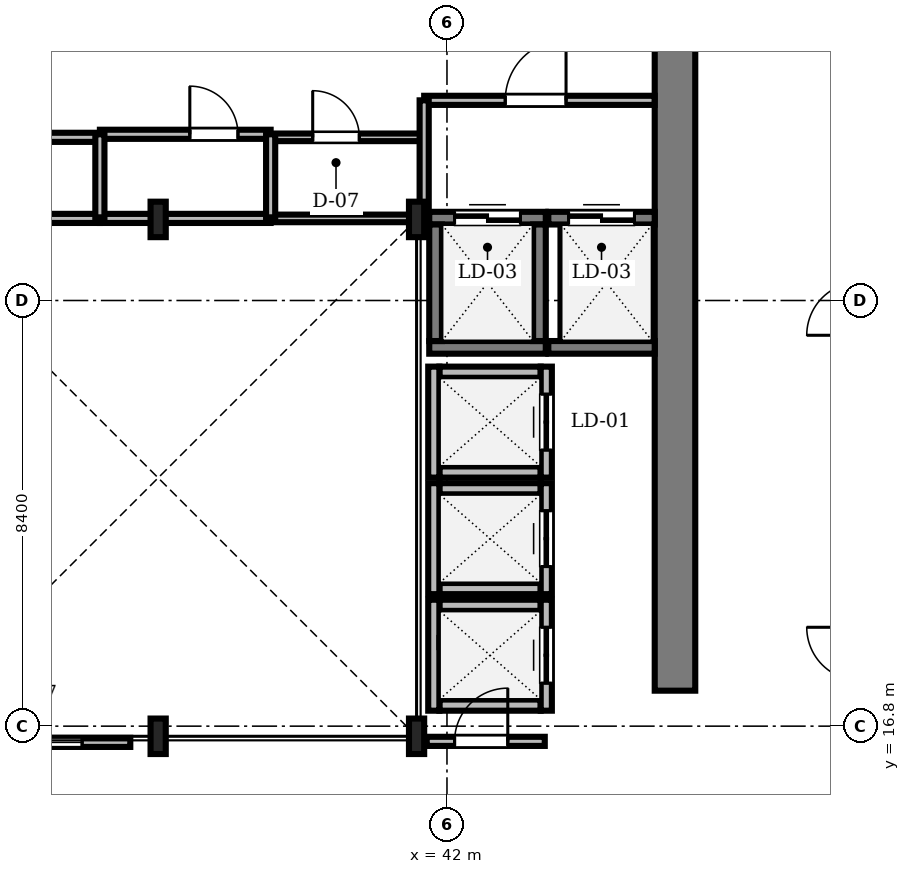
"""IFC4 building model, lengths in metres.
Left out: names, types, materials, properties, quantities, classifications, styles, units other than length and angle.
Written with IfcOpenShell. Run it as: python <this file> out.ifc"""

import sys

from ifc_helpers import new_model, si_unit, direction, frame, frame_2d, origin, origin_2d, place, context, subcontext, project, spatial, rectangle, i_section, extrude, source, transform, mapped, element, fill, save


model = new_model("IFC4")
c1 = context("Model", 3, precision=1e-05, world=origin(), true_north=direction((0.0, 1.0)))
c2 = subcontext(c1, "Body", "Model", "MODEL_VIEW")
j1 = project(units=[si_unit("LENGTHUNIT", "METRE"), si_unit("PLANEANGLEUNIT", "RADIAN")], contexts=[c1])
p1 = place(None, origin())
s1 = spatial("IfcSite", under=j1, at=p1, CompositionType="ELEMENT")
p2 = place(p1, origin())
s2 = spatial("IfcBuilding", under=s1, at=p2, CompositionType="ELEMENT")
p3 = place(p2, frame((0.0, 0.0, 196.05)))
s3 = spatial("IfcBuildingStorey", under=s2, at=p3, CompositionType="ELEMENT", Elevation=196.05)
m1 = source(origin(), c2, "Body", "SweptSolid", [
    extrude(rectangle(XDim=13.15, YDim=0.8, at=frame_2d((6.575, 0.0))), origin(), (0.0, 0.0, 1.0), 3.53),
])
p4 = place(p3, frame((46.5, 17.5, 0.0), z_axis=(0.0, 0.0, 1.0), x_axis=(0.0, 1.0, 0.0)))
e1 = element("IfcWall", 1, at=p4, inside=s3, PredefinedType="SHEAR", context=c2, shape_type="MappedRepresentation", body=[
    mapped(m1, transform((0.0, 0.0, 0.0), scale=1.0)),
])
m2 = source(origin(), c2, "Body", "SweptSolid", [
    extrude(i_section(OverallWidth=0.3, OverallDepth=0.7, WebThickness=0.017, FlangeThickness=0.032, FilletRadius=0.027, at=origin_2d()), origin(), (0.0, 0.0, 1.0), 3.53),
])
for number, where, z_axis, x_axis in (
    (2, (36.3, 16.6, 0.0), (0.0, 0.0, 1.0), (1.0, 0.0, 0.0)),
    (3, (41.4, 16.6, 0.0), (0.0, 0.0, 1.0), (1.0, 0.0, 0.0)),
    (4, (41.4, 26.8, 0.0), (0.0, 0.0, 1.0), (1.0, 0.0, 0.0)),
    (5, (36.3, 26.8, 0.0), (0.0, 0.0, 1.0), (1.0, 0.0, 0.0)),
):
    element("IfcColumn", number, at=place(p3, frame(where, z_axis=z_axis, x_axis=x_axis)), inside=s3, PredefinedType="COLUMN", context=c2, shape_type="MappedRepresentation", body=[
        mapped(m2, transform((0.0, 0.0, 0.0), scale=1.0)),
    ])
m3 = source(origin(), c2, "Body", "SweptSolid", [
    extrude(rectangle(XDim=2.0, YDim=0.22, at=frame_2d((1.0, 0.0))), origin(), (0.0, 0.0, 1.0), 3.53),
])
for number, where, z_axis, x_axis in (
    (6, (41.85, 21.815, 0.0), (0.0, 0.0, 1.0), (1.0, 0.0, 0.0)),
    (7, (41.85, 23.785, 0.0), (0.0, 0.0, 1.0), (1.0, 0.0, 0.0)),
):
    element("IfcWall", number, at=place(p3, frame(where, z_axis=z_axis, x_axis=x_axis)), inside=s3, PredefinedType="SOLIDWALL", context=c2, shape_type="MappedRepresentation", body=[
        mapped(m3, transform((0.0, 0.0, 0.0), scale=1.0)),
    ])
m4 = source(origin(), c2, "Body", "SweptSolid", [
    extrude(rectangle(XDim=2.19, YDim=0.22, at=frame_2d((1.095, 0.0))), origin(), (0.0, 0.0, 1.0), 3.53),
])
p5 = place(p3, frame((41.74, 21.705, 0.0), z_axis=(0.0, 0.0, 1.0), x_axis=(0.0, 1.0, 0.0)))
e8 = element("IfcWall", 8, at=p5, inside=s3, PredefinedType="SOLIDWALL", context=c2, shape_type="MappedRepresentation", body=[
    mapped(m4, transform((0.0, 0.0, 0.0), scale=1.0)),
])
p6 = place(p3, frame((43.96, 21.705, 0.0), z_axis=(0.0, 0.0, 1.0), x_axis=(0.0, 1.0, 0.0)))
e9 = element("IfcWall", 9, at=p6, inside=s3, PredefinedType="SOLIDWALL", context=c2, shape_type="MappedRepresentation", body=[
    mapped(m4, transform((0.0, 0.0, 0.0), scale=1.0)),
])
m5 = source(origin(), c2, "Body", "SweptSolid", [
    extrude(rectangle(XDim=1.1, YDim=2.2, at=frame_2d((0.55, 1.1))), frame((0.0, 0.12, 0.0), z_axis=(0.0, -1.0, 0.0), x_axis=(1.0, 0.0, 0.0)), (0.0, 0.0, 1.0), 0.24),
])
p7 = place(p6, frame((0.545, 0.0, 0.0)))
e10 = element("IfcOpeningElement", 10, at=p7, cuts=e9, PredefinedType="OPENING", context=c2, shape_type="MappedRepresentation", body=[
    mapped(m5, transform((0.0, 0.0, 0.0), scale=1.0)),
])
for number, where, z_axis, x_axis in (
    (11, (41.85, 19.515, 0.0), (0.0, 0.0, 1.0), (1.0, 0.0, 0.0)),
    (12, (41.85, 21.485, 0.0), (0.0, 0.0, 1.0), (1.0, 0.0, 0.0)),
):
    element("IfcWall", number, at=place(p3, frame(where, z_axis=z_axis, x_axis=x_axis)), inside=s3, PredefinedType="SOLIDWALL", context=c2, shape_type="MappedRepresentation", body=[
        mapped(m3, transform((0.0, 0.0, 0.0), scale=1.0)),
    ])
p8 = place(p3, frame((41.74, 19.405, 0.0), z_axis=(0.0, 0.0, 1.0), x_axis=(0.0, 1.0, 0.0)))
e13 = element("IfcWall", 13, at=p8, inside=s3, PredefinedType="SOLIDWALL", context=c2, shape_type="MappedRepresentation", body=[
    mapped(m4, transform((0.0, 0.0, 0.0), scale=1.0)),
])
p9 = place(p3, frame((43.96, 19.405, 0.0), z_axis=(0.0, 0.0, 1.0), x_axis=(0.0, 1.0, 0.0)))
e14 = element("IfcWall", 14, at=p9, inside=s3, PredefinedType="SOLIDWALL", context=c2, shape_type="MappedRepresentation", body=[
    mapped(m4, transform((0.0, 0.0, 0.0), scale=1.0)),
])
p10 = place(p9, frame((0.545, 0.0, 0.0)))
e15 = element("IfcOpeningElement", 15, at=p10, cuts=e14, PredefinedType="OPENING", context=c2, shape_type="MappedRepresentation", body=[
    mapped(m5, transform((0.0, 0.0, 0.0), scale=1.0)),
])
for number, where, z_axis, x_axis in (
    (16, (41.85, 17.215, 0.0), (0.0, 0.0, 1.0), (1.0, 0.0, 0.0)),
    (17, (41.85, 19.185, 0.0), (0.0, 0.0, 1.0), (1.0, 0.0, 0.0)),
):
    element("IfcWall", number, at=place(p3, frame(where, z_axis=z_axis, x_axis=x_axis)), inside=s3, PredefinedType="SOLIDWALL", context=c2, shape_type="MappedRepresentation", body=[
        mapped(m3, transform((0.0, 0.0, 0.0), scale=1.0)),
    ])
p11 = place(p3, frame((41.74, 17.105, 0.0), z_axis=(0.0, 0.0, 1.0), x_axis=(0.0, 1.0, 0.0)))
e18 = element("IfcWall", 18, at=p11, inside=s3, PredefinedType="SOLIDWALL", context=c2, shape_type="MappedRepresentation", body=[
    mapped(m4, transform((0.0, 0.0, 0.0), scale=1.0)),
])
p12 = place(p3, frame((43.96, 17.105, 0.0), z_axis=(0.0, 0.0, 1.0), x_axis=(0.0, 1.0, 0.0)))
e19 = element("IfcWall", 19, at=p12, inside=s3, PredefinedType="SOLIDWALL", context=c2, shape_type="MappedRepresentation", body=[
    mapped(m4, transform((0.0, 0.0, 0.0), scale=1.0)),
])
p13 = place(p12, frame((0.545, 0.0, 0.0)))
e20 = element("IfcOpeningElement", 20, at=p13, cuts=e19, PredefinedType="OPENING", context=c2, shape_type="MappedRepresentation", body=[
    mapped(m5, transform((0.0, 0.0, 0.0), scale=1.0)),
])
m6 = source(origin(), c2, "Body", "SweptSolid", [
    extrude(rectangle(XDim=2.3, YDim=0.25, at=frame_2d((1.15, 0.0))), origin(), (0.0, 0.0, 1.0), 3.53),
])
p14 = place(p3, frame((41.65, 24.275, 0.0), z_axis=(0.0, 0.0, 1.0), x_axis=(1.0, 0.0, 0.0)))
e21 = element("IfcWall", 21, at=p14, inside=s3, PredefinedType="SOLIDWALL", context=c2, shape_type="MappedRepresentation", body=[
    mapped(m6, transform((0.0, 0.0, 0.0), scale=1.0)),
])
p15 = place(p3, frame((41.65, 26.825, 0.0), z_axis=(0.0, 0.0, 1.0), x_axis=(1.0, 0.0, 0.0)))
e22 = element("IfcWall", 22, at=p15, inside=s3, PredefinedType="SOLIDWALL", context=c2, shape_type="MappedRepresentation", body=[
    mapped(m6, transform((0.0, 0.0, 0.0), scale=1.0)),
])
m7 = source(origin(), c2, "Body", "SweptSolid", [
    extrude(rectangle(XDim=1.3, YDim=2.3, at=frame_2d((0.65, 1.15))), frame((0.0, 0.135, 0.0), z_axis=(0.0, -1.0, 0.0), x_axis=(1.0, 0.0, 0.0)), (0.0, 0.0, 1.0), 0.27),
])
p16 = place(p15, frame((0.5, 0.0, 0.0)))
e23 = element("IfcOpeningElement", 23, at=p16, cuts=e22, PredefinedType="OPENING", context=c2, shape_type="MappedRepresentation", body=[
    mapped(m7, transform((0.0, 0.0, 0.0), scale=1.0)),
])
for number, where, z_axis, x_axis in (
    (24, (41.775, 24.4, 0.0), (0.0, 0.0, 1.0), (0.0, 1.0, 0.0)),
    (25, (43.825, 24.4, 0.0), (0.0, 0.0, 1.0), (0.0, 1.0, 0.0)),
):
    element("IfcWall", number, at=place(p3, frame(where, z_axis=z_axis, x_axis=x_axis)), inside=s3, PredefinedType="SOLIDWALL", context=c2, shape_type="MappedRepresentation", body=[
        mapped(m6, transform((0.0, 0.0, 0.0), scale=1.0)),
    ])
m8 = source(origin(), c2, "Body", "SweptSolid", [
    extrude(rectangle(XDim=2.1, YDim=0.25, at=frame_2d((1.05, 0.0))), origin(), (0.0, 0.0, 1.0), 3.53),
])
p17 = place(p3, frame((44.0, 24.275, 0.0), z_axis=(0.0, 0.0, 1.0), x_axis=(1.0, 0.0, 0.0)))
e26 = element("IfcWall", 26, at=p17, inside=s3, PredefinedType="SOLIDWALL", context=c2, shape_type="MappedRepresentation", body=[
    mapped(m8, transform((0.0, 0.0, 0.0), scale=1.0)),
])
p18 = place(p3, frame((44.0, 26.825, 0.0), z_axis=(0.0, 0.0, 1.0), x_axis=(1.0, 0.0, 0.0)))
e27 = element("IfcWall", 27, at=p18, inside=s3, PredefinedType="SOLIDWALL", context=c2, shape_type="MappedRepresentation", body=[
    mapped(m8, transform((0.0, 0.0, 0.0), scale=1.0)),
])
p19 = place(p18, frame((0.4, 0.0, 0.0)))
e28 = element("IfcOpeningElement", 28, at=p19, cuts=e27, PredefinedType="OPENING", context=c2, shape_type="MappedRepresentation", body=[
    mapped(m7, transform((0.0, 0.0, 0.0), scale=1.0)),
])
m9 = source(origin(), c2, "Body", "SweptSolid", [
    extrude(rectangle(XDim=4.548, YDim=0.18, at=frame_2d((2.274, 0.0))), origin(), (0.0, 0.0, 1.0), 3.162),
])
p20 = place(p3, frame((41.55, 29.15, 0.0), z_axis=(0.0, 0.0, 1.0), x_axis=(1.0, 0.0, 0.0)))
e29 = element("IfcWall", 29, at=p20, inside=s3, PredefinedType="PARTITIONING", context=c2, shape_type="MappedRepresentation", body=[
    mapped(m9, transform((0.0, 0.0, 0.0), scale=1.0)),
])
m10 = source(origin(), c2, "Body", "SweptSolid", [
    extrude(rectangle(XDim=1.2, YDim=2.2, at=frame_2d((0.6, 1.1))), frame((0.0, 0.1, 0.0), z_axis=(0.0, -1.0, 0.0), x_axis=(1.0, 0.0, 0.0)), (0.0, 0.0, 1.0), 0.2),
])
p21 = place(p20, frame((1.6, 0.0, 0.0)))
e30 = element("IfcOpeningElement", 30, at=p21, cuts=e29, PredefinedType="OPENING", context=c2, shape_type="MappedRepresentation", body=[
    mapped(m10, transform((0.0, 0.0, 0.0), scale=1.0)),
])
m11 = source(origin(), c2, "Body", "SweptSolid", [
    extrude(rectangle(XDim=3.7, YDim=0.18, at=frame_2d((1.85, 0.0))), origin(), (0.0, 0.0, 1.0), 3.162),
])
p22 = place(p3, frame((31.45, 28.42, 0.0), z_axis=(0.0, 0.0, 1.0), x_axis=(1.0, 0.0, 0.0)))
e31 = element("IfcWall", 31, at=p22, inside=s3, PredefinedType="PARTITIONING", context=c2, shape_type="MappedRepresentation", body=[
    mapped(m11, transform((0.0, 0.0, 0.0), scale=1.0)),
])
m12 = source(origin(), c2, "Body", "SweptSolid", [
    extrude(rectangle(XDim=0.92, YDim=2.1, at=frame_2d((0.46, 1.05))), frame((0.0, 0.1, 0.0), z_axis=(0.0, -1.0, 0.0), x_axis=(1.0, 0.0, 0.0)), (0.0, 0.0, 1.0), 0.2),
])
p23 = place(p22, frame((0.9, 0.0, 0.0)))
e32 = element("IfcOpeningElement", 32, at=p23, cuts=e31, PredefinedType="OPENING", context=c2, shape_type="MappedRepresentation", body=[
    mapped(m12, transform((0.0, 0.0, 0.0), scale=1.0)),
])
m13 = source(origin(), c2, "Body", "SweptSolid", [
    extrude(rectangle(XDim=3.37, YDim=0.18, at=frame_2d((1.685, 0.0))), origin(), (0.0, 0.0, 1.0), 3.53),
])
p24 = place(p3, frame((35.15, 28.48, 0.0), z_axis=(0.0, 0.0, 1.0), x_axis=(1.0, 0.0, 0.0)))
e33 = element("IfcWall", 33, at=p24, inside=s3, PredefinedType="PARTITIONING", context=c2, shape_type="MappedRepresentation", body=[
    mapped(m13, transform((0.0, 0.0, 0.0), scale=1.0)),
])
m14 = source(origin(), c2, "Body", "SweptSolid", [
    extrude(rectangle(XDim=0.95, YDim=2.15, at=frame_2d((0.475, 1.075))), frame((0.0, 0.1, 0.0), z_axis=(0.0, -1.0, 0.0), x_axis=(1.0, 0.0, 0.0)), (0.0, 0.0, 1.0), 0.2),
])
p25 = place(p24, frame((1.775, 0.0, 0.0)))
e34 = element("IfcOpeningElement", 34, at=p25, cuts=e33, PredefinedType="OPENING", context=c2, shape_type="MappedRepresentation", body=[
    mapped(m14, transform((0.0, 0.0, 0.0), scale=1.0)),
])
m15 = source(origin(), c2, "Body", "SweptSolid", [
    extrude(rectangle(XDim=3.0, YDim=0.15, at=frame_2d((1.5, 0.0))), origin(), (0.0, 0.0, 1.0), 3.53),
])
p26 = place(p3, frame((38.52, 28.42, 0.0), z_axis=(0.0, 0.0, 1.0), x_axis=(1.0, 0.0, 0.0)))
e35 = element("IfcWall", 35, at=p26, inside=s3, PredefinedType="PARTITIONING", context=c2, shape_type="MappedRepresentation", body=[
    mapped(m15, transform((0.0, 0.0, 0.0), scale=1.0)),
])
m16 = source(origin(), c2, "Body", "SweptSolid", [
    extrude(rectangle(XDim=0.92, YDim=2.1, at=frame_2d((0.46, 1.05))), frame((0.0, 0.085, 0.0), z_axis=(0.0, -1.0, 0.0), x_axis=(1.0, 0.0, 0.0)), (0.0, 0.0, 1.0), 0.17),
])
p27 = place(p26, frame((0.83, 0.0, 0.0)))
e36 = element("IfcOpeningElement", 36, at=p27, cuts=e35, PredefinedType="OPENING", context=c2, shape_type="MappedRepresentation", body=[
    mapped(m16, transform((0.0, 0.0, 0.0), scale=1.0)),
])
m17 = source(origin(), c2, "Body", "SweptSolid", [
    extrude(rectangle(XDim=2.33, YDim=0.18, at=frame_2d((1.165, 0.0))), origin(), (0.0, 0.0, 1.0), 2.972),
])
p28 = place(p3, frame((41.6, 16.5, 0.0), z_axis=(0.0, 0.0, 1.0), x_axis=(1.0, 0.0, 0.0)))
e37 = element("IfcWall", 37, at=p28, inside=s3, PredefinedType="PARTITIONING", context=c2, shape_type="MappedRepresentation", body=[
    mapped(m17, transform((0.0, 0.0, 0.0), scale=1.0)),
])
m18 = source(origin(), c2, "Body", "SweptSolid", [
    extrude(rectangle(XDim=1.05, YDim=2.2, at=frame_2d((0.525, 1.1))), frame((0.0, 0.1, 0.0), z_axis=(0.0, -1.0, 0.0), x_axis=(1.0, 0.0, 0.0)), (0.0, 0.0, 1.0), 0.2),
])
p29 = place(p28, frame((0.55, 0.0, 0.0)))
e38 = element("IfcOpeningElement", 38, at=p29, cuts=e37, PredefinedType="OPENING", context=c2, shape_type="MappedRepresentation", body=[
    mapped(m18, transform((0.0, 0.0, 0.0), scale=1.0)),
])
m19 = source(origin(), c2, "Body", "SweptSolid", [
    extrude(rectangle(XDim=3.7, YDim=0.18, at=frame_2d((1.85, 0.0))), origin(), (0.0, 0.0, 1.0), 3.072),
])
p30 = place(p3, frame((31.45, 26.82, 0.0), z_axis=(0.0, 0.0, 1.0), x_axis=(1.0, 0.0, 0.0)))
e39 = element("IfcWall", 39, at=p30, inside=s3, PredefinedType="PARTITIONING", context=c2, shape_type="MappedRepresentation", body=[
    mapped(m19, transform((0.0, 0.0, 0.0), scale=1.0)),
])
m20 = source(origin(), c2, "Body", "SweptSolid", [
    extrude(rectangle(XDim=3.37, YDim=0.18, at=frame_2d((1.685, 0.0))), origin(), (0.0, 0.0, 1.0), 3.072),
])
p31 = place(p3, frame((35.15, 26.82, 0.0), z_axis=(0.0, 0.0, 1.0), x_axis=(1.0, 0.0, 0.0)))
e40 = element("IfcWall", 40, at=p31, inside=s3, PredefinedType="PARTITIONING", context=c2, shape_type="MappedRepresentation", body=[
    mapped(m20, transform((0.0, 0.0, 0.0), scale=1.0)),
])
m21 = source(origin(), c2, "Body", "SweptSolid", [
    extrude(rectangle(XDim=3.0, YDim=0.15, at=frame_2d((1.5, 0.0))), origin(), (0.0, 0.0, 1.0), 2.972),
])
p32 = place(p3, frame((38.52, 26.82, 0.0), z_axis=(0.0, 0.0, 1.0), x_axis=(1.0, 0.0, 0.0)))
e41 = element("IfcWall", 41, at=p32, inside=s3, PredefinedType="PARTITIONING", context=c2, shape_type="MappedRepresentation", body=[
    mapped(m21, transform((0.0, 0.0, 0.0), scale=1.0)),
])
m22 = source(origin(), c2, "Body", "SweptSolid", [
    extrude(rectangle(XDim=2.35, YDim=0.18, at=frame_2d((1.175, 0.0))), origin(), (0.0, 0.0, 1.0), 2.972),
])
p33 = place(p3, frame((41.55, 26.8, 0.0), z_axis=(0.0, 0.0, 1.0), x_axis=(0.0, 1.0, 0.0)))
e42 = element("IfcWall", 42, at=p33, inside=s3, PredefinedType="PARTITIONING", context=c2, shape_type="MappedRepresentation", body=[
    mapped(m22, transform((0.0, 0.0, 0.0), scale=1.0)),
])
m23 = source(origin(), c2, "Body", "SweptSolid", [
    extrude(rectangle(XDim=1.858, YDim=0.18, at=frame_2d((0.929, 0.0))), origin(), (0.0, 0.0, 1.0), 3.53),
])
p34 = place(p3, frame((41.852, 18.45, 0.0), z_axis=(0.0, 0.0, 1.0), x_axis=(1.0, 0.0, 0.0)))
e43 = element("IfcWall", 43, at=p34, inside=s3, PredefinedType="PARTITIONING", context=c2, shape_type="MappedRepresentation", body=[
    mapped(m23, transform((0.0, 0.0, 0.0), scale=1.0)),
])
m24 = source(origin(), c2, "Body", "SweptSolid", [
    extrude(rectangle(XDim=1.66, YDim=0.18, at=frame_2d((0.83, 0.0))), origin(), (0.0, 0.0, 1.0), 3.072),
])
for number, where, z_axis, x_axis in (
    (44, (35.15, 26.82, 0.0), (0.0, 0.0, 1.0), (0.0, 1.0, 0.0)),
    (45, (38.52, 26.82, 0.0), (0.0, 0.0, 1.0), (0.0, 1.0, 0.0)),
):
    element("IfcWall", number, at=place(p3, frame(where, z_axis=z_axis, x_axis=x_axis)), inside=s3, PredefinedType="PARTITIONING", context=c2, shape_type="MappedRepresentation", body=[
        mapped(m24, transform((0.0, 0.0, 0.0), scale=1.0)),
    ])
m25 = source(origin(), c2, "Body", "SweptSolid", [
    extrude(rectangle(XDim=3.9, YDim=0.18, at=frame_2d((1.95, 0.0))), origin(), (0.0, 0.0, 1.0), 3.072),
])
p35 = place(p3, frame((31.85, 16.48, 0.0), z_axis=(0.0, 0.0, 1.0), x_axis=(1.0, 0.0, 0.0)))
e46 = element("IfcWall", 46, at=p35, inside=s3, PredefinedType="PARTITIONING", context=c2, shape_type="MappedRepresentation", body=[
    mapped(m25, transform((0.0, 0.0, 0.0), scale=1.0)),
])
m26 = source(origin(), c2, "Body", "SweptSolid", [
    extrude(rectangle(XDim=2.0, YDim=1.9, at=frame_2d((1.0, 0.95))), frame((0.0, 0.1, 0.0), z_axis=(0.0, -1.0, 0.0), x_axis=(1.0, 0.0, 0.0)), (0.0, 0.0, 1.0), 0.2),
])
p36 = place(p35, frame((0.95, 0.0, 0.55)))
e47 = element("IfcOpeningElement", 47, at=p36, cuts=e46, PredefinedType="OPENING", context=c2, shape_type="MappedRepresentation", body=[
    mapped(m26, transform((0.0, 0.0, 0.0), scale=1.0)),
])
m27 = source(origin(), c2, "Body", "SweptSolid", [
    extrude(rectangle(XDim=1.1, YDim=2.2, at=frame_2d((0.55, 1.1))), frame((0.0, 0.025, 0.0), z_axis=(0.0, -1.0, 0.0), x_axis=(1.0, 0.0, 0.0)), (0.0, 0.0, 1.0), 0.05),
])
p37 = place(p7, origin())
e48 = element("IfcDoor", 48, at=p37, inside=s3, OperationType="DOUBLE_DOOR_SLIDING", PredefinedType="DOOR", context=c2, shape_type="MappedRepresentation", body=[
    mapped(m27, transform((0.0, 0.0, 0.0), scale=1.0)),
])
fill(e10, e48)
p38 = place(p10, origin())
e49 = element("IfcDoor", 49, at=p38, inside=s3, OperationType="DOUBLE_DOOR_SLIDING", PredefinedType="DOOR", context=c2, shape_type="MappedRepresentation", body=[
    mapped(m27, transform((0.0, 0.0, 0.0), scale=1.0)),
])
fill(e15, e49)
p39 = place(p13, origin())
e50 = element("IfcDoor", 50, at=p39, inside=s3, OperationType="DOUBLE_DOOR_SLIDING", PredefinedType="DOOR", context=c2, shape_type="MappedRepresentation", body=[
    mapped(m27, transform((0.0, 0.0, 0.0), scale=1.0)),
])
fill(e20, e50)
m28 = source(origin(), c2, "Body", "SweptSolid", [
    extrude(rectangle(XDim=1.3, YDim=2.3, at=frame_2d((0.65, 1.15))), frame((0.0, 0.025, 0.0), z_axis=(0.0, -1.0, 0.0), x_axis=(1.0, 0.0, 0.0)), (0.0, 0.0, 1.0), 0.05),
])
p40 = place(p16, origin())
e51 = element("IfcDoor", 51, at=p40, inside=s3, OperationType="DOUBLE_DOOR_SLIDING", PredefinedType="DOOR", context=c2, shape_type="MappedRepresentation", body=[
    mapped(m28, transform((0.0, 0.0, 0.0), scale=1.0)),
])
fill(e23, e51)
p41 = place(p19, origin())
e52 = element("IfcDoor", 52, at=p41, inside=s3, OperationType="DOUBLE_DOOR_SLIDING", PredefinedType="DOOR", context=c2, shape_type="MappedRepresentation", body=[
    mapped(m28, transform((0.0, 0.0, 0.0), scale=1.0)),
])
fill(e28, e52)
m29 = source(origin(), c2, "Body", "SweptSolid", [
    extrude(rectangle(XDim=1.2, YDim=2.2, at=frame_2d((0.6, 1.1))), frame((0.0, 0.025, 0.0), z_axis=(0.0, -1.0, 0.0), x_axis=(1.0, 0.0, 0.0)), (0.0, 0.0, 1.0), 0.05),
])
p42 = place(p21, origin())
e53 = element("IfcDoor", 53, at=p42, inside=s3, OperationType="SINGLE_SWING_RIGHT", PredefinedType="DOOR", context=c2, shape_type="MappedRepresentation", body=[
    mapped(m29, transform((0.0, 0.0, 0.0), scale=1.0)),
])
fill(e30, e53)
m30 = source(origin(), c2, "Body", "SweptSolid", [
    extrude(rectangle(XDim=0.95, YDim=2.15, at=frame_2d((0.475, 1.075))), frame((0.0, 0.025, 0.0), z_axis=(0.0, -1.0, 0.0), x_axis=(1.0, 0.0, 0.0)), (0.0, 0.0, 1.0), 0.05),
])
p43 = place(p25, origin())
e54 = element("IfcDoor", 54, at=p43, inside=s3, OperationType="SINGLE_SWING_LEFT", PredefinedType="DOOR", context=c2, shape_type="MappedRepresentation", body=[
    mapped(m30, transform((0.0, 0.0, 0.0), scale=1.0)),
])
fill(e34, e54)
m31 = source(origin(), c2, "Body", "SweptSolid", [
    extrude(rectangle(XDim=0.92, YDim=2.1, at=frame_2d((0.46, 1.05))), frame((0.0, 0.025, 0.0), z_axis=(0.0, -1.0, 0.0), x_axis=(1.0, 0.0, 0.0)), (0.0, 0.0, 1.0), 0.05),
])
p44 = place(p27, origin())
e55 = element("IfcDoor", 55, at=p44, inside=s3, OperationType="SINGLE_SWING_LEFT", PredefinedType="DOOR", context=c2, shape_type="MappedRepresentation", body=[
    mapped(m31, transform((0.0, 0.0, 0.0), scale=1.0)),
])
fill(e36, e55)
m32 = source(origin(), c2, "Body", "SweptSolid", [
    extrude(rectangle(XDim=1.05, YDim=2.2, at=frame_2d((0.525, 1.1))), frame((0.0, 0.025, 0.0), z_axis=(0.0, -1.0, 0.0), x_axis=(1.0, 0.0, 0.0)), (0.0, 0.0, 1.0), 0.05),
])
p45 = place(p29, origin())
e56 = element("IfcDoor", 56, at=p45, inside=s3, OperationType="SINGLE_SWING_RIGHT", PredefinedType="DOOR", context=c2, shape_type="MappedRepresentation", body=[
    mapped(m32, transform((0.0, 0.0, 0.0), scale=1.0)),
])
fill(e38, e56)
m33 = source(origin(), c2, "Body", "SweptSolid", [
    extrude(rectangle(XDim=2.0, YDim=1.9, at=frame_2d((1.0, 0.95))), frame((0.0, 0.03, 0.0), z_axis=(0.0, -1.0, 0.0), x_axis=(1.0, 0.0, 0.0)), (0.0, 0.0, 1.0), 0.06),
])
p46 = place(p36, origin())
e57 = element("IfcWindow", 57, at=p46, inside=s3, PartitioningType="SINGLE_PANEL", PredefinedType="WINDOW", context=c2, shape_type="MappedRepresentation", body=[
    mapped(m33, transform((0.0, 0.0, 0.0), scale=1.0)),
])
fill(e47, e57)
save(model, sys.argv[1])
